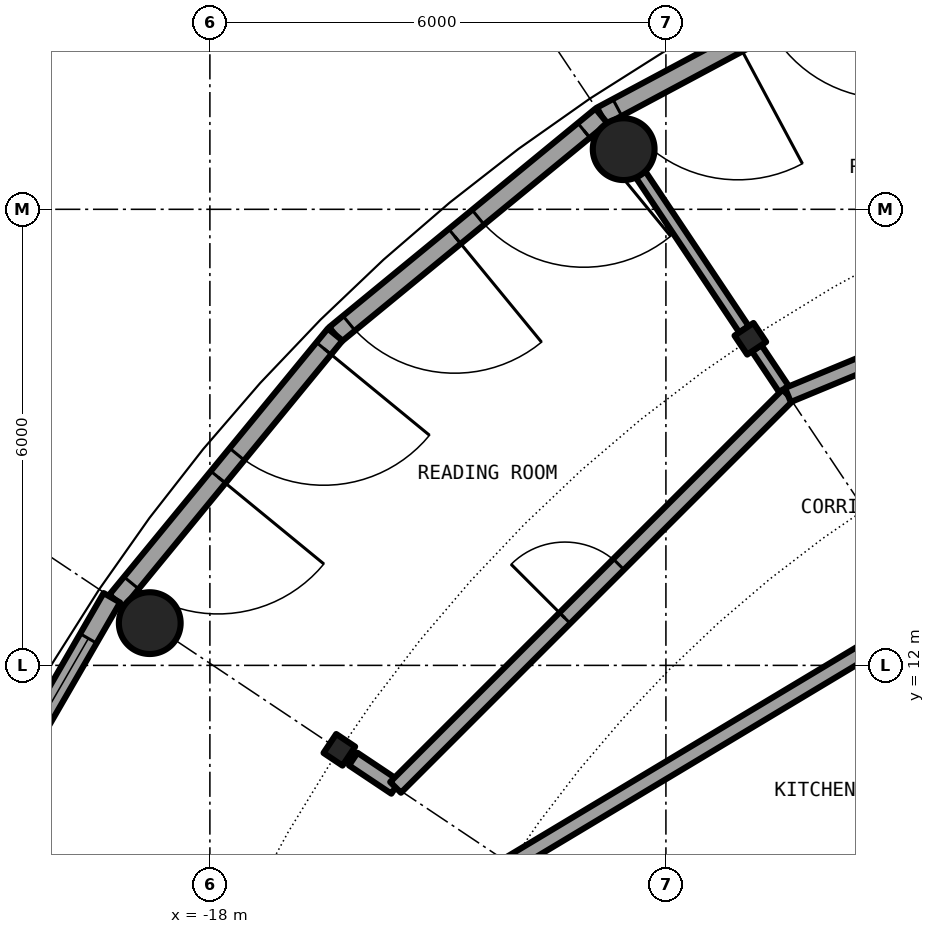
"""IFC4 building model, lengths in metres.
Left out: names, types, materials, properties, quantities, classifications, styles, units other than length and angle.
Written with IfcOpenShell. Run it as: python <this file> out.ifc"""

import sys

from ifc_helpers import new_model, si_unit, direction, frame, frame_2d, origin, origin_2d, place, context, subcontext, project, spatial, rectangle, hollow_circle, i_section, extrude, element, fill, save


model = new_model("IFC4")
c1 = context("Model", 3, precision=1e-05, world=origin(), true_north=direction((0.0, 1.0)))
c2 = subcontext(c1, "Body", "Model", "MODEL_VIEW")
j1 = project(units=[si_unit("LENGTHUNIT", "METRE"), si_unit("PLANEANGLEUNIT", "RADIAN")], contexts=[c1])
p1 = place(None, origin())
s1 = spatial("IfcSite", under=j1, at=p1, CompositionType="ELEMENT")
p2 = place(p1, origin())
s2 = spatial("IfcBuilding", under=s1, at=p2, CompositionType="ELEMENT")
p3 = place(p2, frame((0.0, 0.0, 249.3)))
s3 = spatial("IfcBuildingStorey", under=s2, at=p3, CompositionType="ELEMENT", Elevation=249.3)
for number, where, z_axis, x_axis in (
    (1, (-12.556, 18.791, 0.0), (0.0, 0.0, 1.0), (1.0, 0.0, 0.0)),
    (2, (-18.791, 12.556, 0.0), (0.0, 0.0, 1.0), (1.0, 0.0, 0.0)),
):
    element("IfcColumn", number, at=place(p3, frame(where, z_axis=z_axis, x_axis=x_axis)), inside=s3, PredefinedType="COLUMN", context=c2, shape_type="SweptSolid", body=[
        extrude(hollow_circle(Radius=0.406, WallThickness=0.03, at=origin_2d()), origin(), (0.0, 0.0, 1.0), 3.05),
    ])
for number, where, z_axis, x_axis in (
    (3, (-10.889, 16.297, 0.0), (0.0, 0.0, 1.0), (-0.556, 0.831, 0.0)),
    (4, (-16.297, 10.889, 0.0), (0.0, 0.0, 1.0), (-0.831, 0.556, 0.0)),
):
    element("IfcColumn", number, at=place(p3, frame(where, z_axis=z_axis, x_axis=x_axis)), inside=s3, PredefinedType="COLUMN", context=c2, shape_type="SweptSolid", body=[
        extrude(i_section(OverallWidth=0.3, OverallDepth=0.3, WebThickness=0.011, FlangeThickness=0.019, FilletRadius=0.027, at=origin_2d()), origin(), (0.0, 0.0, 1.0), 3.05),
    ])
p4 = place(p3, frame((-8.85, 21.365, 0.0), z_axis=(0.0, 0.0, 1.0), x_axis=(-0.881912752543, -0.471412660947, 0.0)))
e5 = element("IfcWall", 5, at=p4, inside=s3, PredefinedType="SOLIDWALL", context=c2, shape_type="SweptSolid", body=[
    extrude(rectangle(XDim=4.533, YDim=0.25, at=frame_2d((2.267, 0.0))), origin(), (0.0, 0.0, 1.0), 2.7),
])
p5 = place(p4, frame((0.236, 0.0, 0.0)))
e6 = element("IfcOpeningElement", 6, at=p5, cuts=e5, PredefinedType="OPENING", context=c2, shape_type="SweptSolid", body=[
    extrude(rectangle(XDim=1.8, YDim=2.2, at=frame_2d((0.9, 1.1))), frame((0.0, 0.135, 0.0), z_axis=(0.0, -1.0, 0.0), x_axis=(1.0, 0.0, 0.0)), (0.0, 0.0, 1.0), 0.27),
])
p6 = place(p4, frame((2.497, 0.0, 0.0)))
e7 = element("IfcOpeningElement", 7, at=p6, cuts=e5, PredefinedType="OPENING", context=c2, shape_type="SweptSolid", body=[
    extrude(rectangle(XDim=1.8, YDim=2.2, at=frame_2d((0.9, 1.1))), frame((0.0, 0.135, 0.0), z_axis=(0.0, -1.0, 0.0), x_axis=(1.0, 0.0, 0.0)), (0.0, 0.0, 1.0), 0.27),
])
p7 = place(p3, frame((-12.848, 19.228, 0.0), z_axis=(0.0, 0.0, 1.0), x_axis=(-0.772989395532, -0.634418942337, 0.0)))
e8 = element("IfcWall", 8, at=p7, inside=s3, PredefinedType="SOLIDWALL", context=c2, shape_type="SweptSolid", body=[
    extrude(rectangle(XDim=4.533, YDim=0.25, at=frame_2d((2.267, 0.0))), origin(), (0.0, 0.0, 1.0), 2.7),
])
p8 = place(p7, frame((0.3, 0.0, 0.0)))
e9 = element("IfcOpeningElement", 9, at=p8, cuts=e8, PredefinedType="OPENING", context=c2, shape_type="SweptSolid", body=[
    extrude(rectangle(XDim=1.8, YDim=2.2, at=frame_2d((0.9, 1.1))), frame((0.0, 0.135, 0.0), z_axis=(0.0, -1.0, 0.0), x_axis=(1.0, 0.0, 0.0)), (0.0, 0.0, 1.0), 0.27),
])
p9 = place(p7, frame((2.497, 0.0, 0.0)))
e10 = element("IfcOpeningElement", 10, at=p9, cuts=e8, PredefinedType="OPENING", context=c2, shape_type="SweptSolid", body=[
    extrude(rectangle(XDim=1.8, YDim=2.2, at=frame_2d((0.9, 1.1))), frame((0.0, 0.135, 0.0), z_axis=(0.0, -1.0, 0.0), x_axis=(1.0, 0.0, 0.0)), (0.0, 0.0, 1.0), 0.27),
])
p10 = place(p3, frame((-16.352, 16.352, 0.0), z_axis=(0.0, 0.0, 1.0), x_axis=(-0.634418942337, -0.772989395532, 0.0)))
e11 = element("IfcWall", 11, at=p10, inside=s3, PredefinedType="SOLIDWALL", context=c2, shape_type="SweptSolid", body=[
    extrude(rectangle(XDim=4.533, YDim=0.25, at=frame_2d((2.267, 0.0))), origin(), (0.0, 0.0, 1.0), 2.7),
])
p11 = place(p10, frame((0.236, 0.0, 0.0)))
e12 = element("IfcOpeningElement", 12, at=p11, cuts=e11, PredefinedType="OPENING", context=c2, shape_type="SweptSolid", body=[
    extrude(rectangle(XDim=1.8, YDim=2.2, at=frame_2d((0.9, 1.1))), frame((0.0, 0.135, 0.0), z_axis=(0.0, -1.0, 0.0), x_axis=(1.0, 0.0, 0.0)), (0.0, 0.0, 1.0), 0.27),
])
p12 = place(p10, frame((2.427, 0.0, 0.0)))
e13 = element("IfcOpeningElement", 13, at=p12, cuts=e11, PredefinedType="OPENING", context=c2, shape_type="SweptSolid", body=[
    extrude(rectangle(XDim=1.8, YDim=2.2, at=frame_2d((0.9, 1.1))), frame((0.0, 0.135, 0.0), z_axis=(0.0, -1.0, 0.0), x_axis=(1.0, 0.0, 0.0)), (0.0, 0.0, 1.0), 0.27),
])
p13 = place(p3, frame((-19.29, 12.889, 0.0), z_axis=(0.0, 0.0, 1.0), x_axis=(-0.499903546559, -0.866081084043, 0.0)))
e14 = element("IfcWall", 14, at=p13, inside=s3, PredefinedType="SOLIDWALL", context=c2, shape_type="SweptSolid", body=[
    extrude(rectangle(XDim=3.034, YDim=0.25, at=frame_2d((1.517, 0.0))), origin(), (0.0, 0.0, 1.0), 2.7),
])
p14 = place(p13, frame((0.617, 0.0, 0.3)))
e15 = element("IfcOpeningElement", 15, at=p14, cuts=e14, PredefinedType="OPENING", context=c2, shape_type="SweptSolid", body=[
    extrude(rectangle(XDim=1.8, YDim=2.1, at=frame_2d((0.9, 1.05))), frame((0.0, 0.135, 0.0), z_axis=(0.0, -1.0, 0.0), x_axis=(1.0, 0.0, 0.0)), (0.0, 0.0, 1.0), 0.27),
])
p15 = place(p3, frame((-16.114, 10.767, 0.0), z_axis=(0.0, 0.0, 1.0), x_axis=(0.831601508083, -0.555372786292, 0.0)))
e16 = element("IfcWall", 16, at=p15, inside=s3, PredefinedType="PARTITIONING", context=c2, shape_type="SweptSolid", body=[
    extrude(rectangle(XDim=0.67, YDim=0.2, at=frame_2d((0.335, 0.0))), origin(), (0.0, 0.0, 1.0), 2.7),
])
p16 = place(p3, frame((-12.334, 18.46, 0.0), z_axis=(0.0, 0.0, 1.0), x_axis=(0.55541269892, -0.831574851639, 0.0)))
e17 = element("IfcWall", 17, at=p16, inside=s3, PredefinedType="PARTITIONING", context=c2, shape_type="SweptSolid", body=[
    extrude(rectangle(XDim=2.451, YDim=0.15, at=frame_2d((1.225, 0.0))), origin(), (0.0, 0.0, 1.0), 2.7),
])
p17 = place(p3, frame((-10.806, 16.172, 0.0), z_axis=(0.0, 0.0, 1.0), x_axis=(0.55538538696, -0.831593092775, 0.0)))
e18 = element("IfcWall", 18, at=p17, inside=s3, PredefinedType="PARTITIONING", context=c2, shape_type="SweptSolid", body=[
    extrude(rectangle(XDim=0.74, YDim=0.15, at=frame_2d((0.37, 0.0))), origin(), (0.0, 0.0, 1.0), 2.7),
])
p18 = place(p3, frame((-9.955, 8.996, 0.0), z_axis=(0.0, 0.0, 1.0), x_axis=(0.857587239633, 0.514338532894, 0.0)))
e19 = element("IfcWall", 19, at=p18, inside=s3, PredefinedType="PARTITIONING", context=c2, shape_type="SweptSolid", body=[
    extrude(rectangle(XDim=5.938, YDim=0.1, at=frame_2d((2.969, 0.0))), origin(), (0.0, 0.0, 1.0), 2.7),
])
p19 = place(p3, frame((-14.052, 9.389, 0.0), z_axis=(0.0, 0.0, 1.0), x_axis=(0.857683679102, 0.51417769944, 0.0)))
e20 = element("IfcWall", 20, at=p19, inside=s3, PredefinedType="PARTITIONING", context=c2, shape_type="SweptSolid", body=[
    extrude(rectangle(XDim=14.451, YDim=0.2, at=frame_2d((7.225, 0.0))), origin(), (0.0, 0.0, 1.0), 2.7),
])
p20 = place(p19, frame((9.134, 0.0, 0.0)))
e21 = element("IfcOpeningElement", 21, at=p20, cuts=e20, PredefinedType="OPENING", context=c2, shape_type="SweptSolid", body=[
    extrude(rectangle(XDim=1.0, YDim=2.3, at=frame_2d((0.5, 1.15))), frame((0.0, 0.11, 0.0), z_axis=(0.0, -1.0, 0.0), x_axis=(1.0, 0.0, 0.0)), (0.0, 0.0, 1.0), 0.22),
])
p21 = place(p3, frame((-15.557, 10.395, 0.0), z_axis=(0.0, 0.0, 1.0), x_axis=(0.707106781187, 0.707106781187, 0.0)))
e22 = element("IfcWall", 22, at=p21, inside=s3, PredefinedType="PARTITIONING", context=c2, shape_type="SweptSolid", body=[
    extrude(rectangle(XDim=7.3, YDim=0.2, at=frame_2d((3.65, 0.0))), origin(), (0.0, 0.0, 1.0), 2.7),
])
p22 = place(p21, frame((3.15, 0.0, 0.0)))
e23 = element("IfcOpeningElement", 23, at=p22, cuts=e22, PredefinedType="OPENING", context=c2, shape_type="SweptSolid", body=[
    extrude(rectangle(XDim=1.0, YDim=2.3, at=frame_2d((0.5, 1.15))), frame((0.0, 0.11, 0.0), z_axis=(0.0, -1.0, 0.0), x_axis=(1.0, 0.0, 0.0)), (0.0, 0.0, 1.0), 0.22),
])
p23 = place(p3, frame((-10.395, 15.557, 0.0), z_axis=(0.0, 0.0, 1.0), x_axis=(0.923866436038, 0.382715048518, 0.0)))
e24 = element("IfcWall", 24, at=p23, inside=s3, PredefinedType="PARTITIONING", context=c2, shape_type="SweptSolid", body=[
    extrude(rectangle(XDim=7.301, YDim=0.2, at=frame_2d((3.65, 0.0))), origin(), (0.0, 0.0, 1.0), 2.7),
])
p24 = place(p23, frame((3.15, 0.0, 0.0)))
e25 = element("IfcOpeningElement", 25, at=p24, cuts=e24, PredefinedType="OPENING", context=c2, shape_type="SweptSolid", body=[
    extrude(rectangle(XDim=1.0, YDim=2.3, at=frame_2d((0.5, 1.15))), frame((0.0, 0.11, 0.0), z_axis=(0.0, -1.0, 0.0), x_axis=(1.0, 0.0, 0.0)), (0.0, 0.0, 1.0), 0.22),
])
p25 = place(p6, origin())
e26 = element("IfcDoor", 26, at=p25, inside=s3, OperationType="SINGLE_SWING_LEFT", PredefinedType="DOOR", context=c2, shape_type="SweptSolid", body=[
    extrude(rectangle(XDim=1.8, YDim=2.2, at=frame_2d((0.9, 1.1))), frame((0.0, 0.025, 0.0), z_axis=(0.0, -1.0, 0.0), x_axis=(1.0, 0.0, 0.0)), (0.0, 0.0, 1.0), 0.05),
])
fill(e7, e26)
p26 = place(p8, origin())
e27 = element("IfcDoor", 27, at=p26, inside=s3, OperationType="SINGLE_SWING_LEFT", PredefinedType="DOOR", context=c2, shape_type="SweptSolid", body=[
    extrude(rectangle(XDim=1.8, YDim=2.2, at=frame_2d((0.9, 1.1))), frame((0.0, 0.025, 0.0), z_axis=(0.0, -1.0, 0.0), x_axis=(1.0, 0.0, 0.0)), (0.0, 0.0, 1.0), 0.05),
])
fill(e9, e27)
p27 = place(p9, origin())
e28 = element("IfcDoor", 28, at=p27, inside=s3, OperationType="SINGLE_SWING_LEFT", PredefinedType="DOOR", context=c2, shape_type="SweptSolid", body=[
    extrude(rectangle(XDim=1.8, YDim=2.2, at=frame_2d((0.9, 1.1))), frame((0.0, 0.025, 0.0), z_axis=(0.0, -1.0, 0.0), x_axis=(1.0, 0.0, 0.0)), (0.0, 0.0, 1.0), 0.05),
])
fill(e10, e28)
p28 = place(p11, origin())
e29 = element("IfcDoor", 29, at=p28, inside=s3, OperationType="SINGLE_SWING_LEFT", PredefinedType="DOOR", context=c2, shape_type="SweptSolid", body=[
    extrude(rectangle(XDim=1.8, YDim=2.2, at=frame_2d((0.9, 1.1))), frame((0.0, 0.025, 0.0), z_axis=(0.0, -1.0, 0.0), x_axis=(1.0, 0.0, 0.0)), (0.0, 0.0, 1.0), 0.05),
])
fill(e12, e29)
p29 = place(p12, origin())
e30 = element("IfcDoor", 30, at=p29, inside=s3, OperationType="SINGLE_SWING_LEFT", PredefinedType="DOOR", context=c2, shape_type="SweptSolid", body=[
    extrude(rectangle(XDim=1.8, YDim=2.2, at=frame_2d((0.9, 1.1))), frame((0.0, 0.025, 0.0), z_axis=(0.0, -1.0, 0.0), x_axis=(1.0, 0.0, 0.0)), (0.0, 0.0, 1.0), 0.05),
])
fill(e13, e30)
p30 = place(p14, origin())
e31 = element("IfcWindow", 31, at=p30, inside=s3, PartitioningType="SINGLE_PANEL", PredefinedType="WINDOW", context=c2, shape_type="SweptSolid", body=[
    extrude(rectangle(XDim=1.8, YDim=2.1, at=frame_2d((0.9, 1.05))), frame((0.0, 0.03, 0.0), z_axis=(0.0, -1.0, 0.0), x_axis=(1.0, 0.0, 0.0)), (0.0, 0.0, 1.0), 0.06),
])
fill(e15, e31)
p31 = place(p22, origin())
e32 = element("IfcDoor", 32, at=p31, inside=s3, OperationType="SINGLE_SWING_LEFT", PredefinedType="DOOR", context=c2, shape_type="SweptSolid", body=[
    extrude(rectangle(XDim=1.0, YDim=2.3, at=frame_2d((0.5, 1.15))), frame((0.0, 0.025, 0.0), z_axis=(0.0, -1.0, 0.0), x_axis=(1.0, 0.0, 0.0)), (0.0, 0.0, 1.0), 0.05),
])
fill(e23, e32)
save(model, sys.argv[1])
